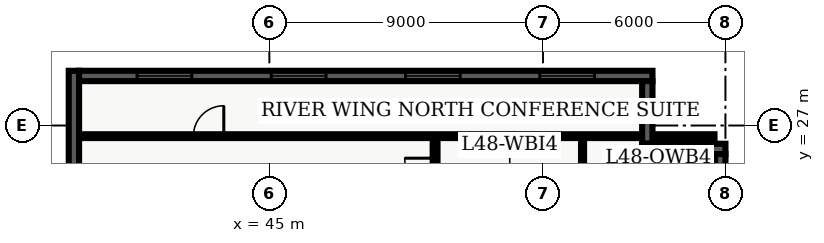
"""IFC4 building model, lengths in metres.
Left out: names, types, materials, properties, quantities, classifications, styles, units other than length and angle.
Written with IfcOpenShell. Run it as: python <this file> out.ifc"""

import sys

from ifc_helpers import new_model, entity, si_unit, converted_unit, direction, frame, origin_with_axes, origin_2d_with_axis, place, context, subcontext, project, spatial, polyline, rectangle, outline, extrude, element, fill, save


model = new_model("IFC4")
c1 = context("Model", 3, precision=1e-05, world=origin_with_axes(), true_north=direction((0.0, 1.0)))
c2 = subcontext(c1, "Body", "Model", "MODEL_VIEW")
j1 = project(units=[si_unit("LENGTHUNIT", "METRE"), converted_unit("PLANEANGLEUNIT", "DEGREE", entity("IfcPlaneAngleMeasure", 0.017), si_unit("PLANEANGLEUNIT", "RADIAN"), dimensions=[0, 0, 0, 0, 0, 0, 0])], contexts=[c1])
p1 = place(None, origin_with_axes())
s1 = spatial("IfcSite", under=j1, at=p1, CompositionType="ELEMENT")
p2 = place(p1, origin_with_axes())
s2 = spatial("IfcBuilding", under=s1, at=p2, CompositionType="ELEMENT")
p3 = place(p2, frame((0.0, 0.0, 196.5), z_axis=(0.0, 0.0, 1.0), x_axis=(1.0, 0.0, 0.0)))
s3 = spatial("IfcBuildingStorey", under=s2, at=p3, CompositionType="ELEMENT", Elevation=196.5)
p4 = place(p3, frame((50.45, 7.85, 0.0), z_axis=(0.0, 0.0, 1.0), x_axis=(0.0, 1.0, 0.0)))
e1 = element("IfcWall", 1, at=p4, inside=s3, PredefinedType="PARTITIONING", context=c2, shape_type="SweptSolid", body=[
    extrude(outline(polyline([(0.0, -0.08), (18.8, -0.08), (18.8, 0.08), (0.0, 0.08), (0.0, -0.08)])), origin_with_axes(), (0.0, 0.0, 1.0), 2.7),
])
p5 = place(p4, frame((0.96, 0.0, 0.0), z_axis=(0.0, 0.0, 1.0), x_axis=(1.0, 0.0, 0.0)))
e2 = element("IfcOpeningElement", 2, at=p5, cuts=e1, PredefinedType="OPENING", context=c2, shape_type="SweptSolid", body=[
    extrude(rectangle(XDim=0.9, YDim=0.18, at=origin_2d_with_axis()), origin_with_axes(), (0.0, 0.0, 1.0), 2.15),
])
p6 = place(p4, frame((6.888, 0.0, 0.0), z_axis=(0.0, 0.0, 1.0), x_axis=(1.0, 0.0, 0.0)))
e3 = element("IfcOpeningElement", 3, at=p6, cuts=e1, PredefinedType="OPENING", context=c2, shape_type="SweptSolid", body=[
    extrude(rectangle(XDim=1.0, YDim=0.18, at=origin_2d_with_axis()), origin_with_axes(), (0.0, 0.0, 1.0), 2.15),
])
p7 = place(p4, frame((12.353, 0.0, 0.0), z_axis=(0.0, 0.0, 1.0), x_axis=(1.0, 0.0, 0.0)))
e4 = element("IfcOpeningElement", 4, at=p7, cuts=e1, PredefinedType="OPENING", context=c2, shape_type="SweptSolid", body=[
    extrude(rectangle(XDim=1.0, YDim=0.18, at=origin_2d_with_axis()), origin_with_axes(), (0.0, 0.0, 1.0), 2.15),
])
p8 = place(p4, frame((17.575, 0.0, 0.0), z_axis=(0.0, 0.0, 1.0), x_axis=(1.0, 0.0, 0.0)))
e5 = element("IfcOpeningElement", 5, at=p8, cuts=e1, PredefinedType="OPENING", context=c2, shape_type="SweptSolid", body=[
    extrude(rectangle(XDim=1.0, YDim=0.18, at=origin_2d_with_axis()), origin_with_axes(), (0.0, 0.0, 1.0), 2.15),
])
p9 = place(p3, frame((38.735, 26.65, 0.0), z_axis=(0.0, 0.0, 1.0), x_axis=(1.0, 0.0, 0.0)))
e6 = element("IfcWall", 6, at=p9, inside=s3, PredefinedType="PARTITIONING", context=c2, shape_type="SweptSolid", body=[
    extrude(outline(polyline([(0.0, -0.062), (20.905, -0.062), (20.905, 0.062), (0.0, 0.062), (0.0, -0.062)])), origin_with_axes(), (0.0, 0.0, 1.0), 2.7),
])
p10 = place(p9, frame((4.265, 0.0, 0.0), z_axis=(0.0, 0.0, 1.0), x_axis=(1.0, 0.0, 0.0)))
e7 = element("IfcOpeningElement", 7, at=p10, cuts=e6, PredefinedType="OPENING", context=c2, shape_type="SweptSolid", body=[
    extrude(rectangle(XDim=1.0, YDim=0.145, at=origin_2d_with_axis()), origin_with_axes(), (0.0, 0.0, 1.0), 2.15),
])
p11 = place(p3, frame((55.3, 7.98, 0.0), z_axis=(0.0, 0.0, 1.0), x_axis=(0.0, 1.0, 0.0)))
e8 = element("IfcWall", 8, at=p11, inside=s3, PredefinedType="PARTITIONING", context=c2, shape_type="SweptSolid", body=[
    extrude(outline(polyline([(0.0, -0.05), (18.54, -0.05), (18.54, 0.05), (0.0, 0.05), (0.0, -0.05)])), origin_with_axes(), (0.0, 0.0, 1.0), 2.7),
])
p12 = place(p11, frame((2.079, 0.0, 0.0), z_axis=(0.0, 0.0, 1.0), x_axis=(1.0, 0.0, 0.0)))
e9 = element("IfcOpeningElement", 9, at=p12, cuts=e8, PredefinedType="OPENING", context=c2, shape_type="SweptSolid", body=[
    extrude(rectangle(XDim=0.95, YDim=0.12, at=origin_2d_with_axis()), origin_with_axes(), (0.0, 0.0, 1.0), 2.15),
])
p13 = place(p11, frame((6.758, 0.0, 0.0), z_axis=(0.0, 0.0, 1.0), x_axis=(1.0, 0.0, 0.0)))
e10 = element("IfcOpeningElement", 10, at=p13, cuts=e8, PredefinedType="OPENING", context=c2, shape_type="SweptSolid", body=[
    extrude(rectangle(XDim=0.95, YDim=0.12, at=origin_2d_with_axis()), origin_with_axes(), (0.0, 0.0, 1.0), 2.15),
])
p14 = place(p11, frame((12.223, 0.0, 0.0), z_axis=(0.0, 0.0, 1.0), x_axis=(1.0, 0.0, 0.0)))
e11 = element("IfcOpeningElement", 11, at=p14, cuts=e8, PredefinedType="OPENING", context=c2, shape_type="SweptSolid", body=[
    extrude(rectangle(XDim=0.95, YDim=0.12, at=origin_2d_with_axis()), origin_with_axes(), (0.0, 0.0, 1.0), 2.15),
])
p15 = place(p11, frame((16.885, 0.0, 0.0), z_axis=(0.0, 0.0, 1.0), x_axis=(1.0, 0.0, 0.0)))
e12 = element("IfcOpeningElement", 12, at=p15, cuts=e8, PredefinedType="OPENING", context=c2, shape_type="SweptSolid", body=[
    extrude(rectangle(XDim=0.95, YDim=0.12, at=origin_2d_with_axis()), origin_with_axes(), (0.0, 0.0, 1.0), 2.15),
])
p16 = place(p3, frame((38.57, 21.26, 0.0), z_axis=(0.0, 0.0, 1.0), x_axis=(0.0, 1.0, 0.0)))
e13 = element("IfcWall", 13, at=p16, inside=s3, PredefinedType="SOLIDWALL", context=c2, shape_type="SweptSolid", body=[
    extrude(outline(polyline([(0.0, -0.17), (7.54, -0.17), (7.54, 0.17), (0.0, 0.17), (0.0, -0.17)])), origin_with_axes(), (0.0, 0.0, 1.0), 3.66),
])
p17 = place(p3, frame((38.74, 28.63, 0.0), z_axis=(0.0, 0.0, 1.0), x_axis=(1.0, 0.0, 0.0)))
e14 = element("IfcWall", 14, at=p17, inside=s3, PredefinedType="SOLIDWALL", context=c2, shape_type="SweptSolid", body=[
    extrude(outline(polyline([(0.0, -0.17), (18.86, -0.17), (18.86, 0.17), (0.0, 0.17), (0.0, -0.17)])), origin_with_axes(), (0.0, 0.0, 1.0), 3.66),
])
p18 = place(p17, frame((2.808, 0.0, 0.45), z_axis=(0.0, 0.0, 1.0), x_axis=(1.0, 0.0, 0.0)))
e15 = element("IfcOpeningElement", 15, at=p18, cuts=e14, PredefinedType="OPENING", context=c2, shape_type="SweptSolid", body=[
    extrude(rectangle(XDim=1.8, YDim=0.36, at=origin_2d_with_axis()), origin_with_axes(), (0.0, 0.0, 1.0), 2.1),
])
p19 = place(p17, frame((7.222, 0.0, 0.45), z_axis=(0.0, 0.0, 1.0), x_axis=(1.0, 0.0, 0.0)))
e16 = element("IfcOpeningElement", 16, at=p19, cuts=e14, PredefinedType="OPENING", context=c2, shape_type="SweptSolid", body=[
    extrude(rectangle(XDim=1.8, YDim=0.36, at=origin_2d_with_axis()), origin_with_axes(), (0.0, 0.0, 1.0), 2.1),
])
p20 = place(p17, frame((11.637, 0.0, 0.45), z_axis=(0.0, 0.0, 1.0), x_axis=(1.0, 0.0, 0.0)))
e17 = element("IfcOpeningElement", 17, at=p20, cuts=e14, PredefinedType="OPENING", context=c2, shape_type="SweptSolid", body=[
    extrude(rectangle(XDim=1.8, YDim=0.36, at=origin_2d_with_axis()), origin_with_axes(), (0.0, 0.0, 1.0), 2.1),
])
p21 = place(p17, frame((16.053, 0.0, 0.45), z_axis=(0.0, 0.0, 1.0), x_axis=(1.0, 0.0, 0.0)))
e18 = element("IfcOpeningElement", 18, at=p21, cuts=e14, PredefinedType="OPENING", context=c2, shape_type="SweptSolid", body=[
    extrude(rectangle(XDim=1.8, YDim=0.36, at=origin_2d_with_axis()), origin_with_axes(), (0.0, 0.0, 1.0), 2.1),
])
p22 = place(p3, frame((57.43, 28.46, 0.0), z_axis=(0.0, 0.0, 1.0), x_axis=(0.0, -1.0, 0.0)))
e19 = element("IfcWall", 19, at=p22, inside=s3, PredefinedType="SOLIDWALL", context=c2, shape_type="SweptSolid", body=[
    extrude(outline(polyline([(0.0, -0.17), (2.06, -0.17), (2.06, 0.17), (0.0, 0.17), (0.0, -0.17)])), origin_with_axes(), (0.0, 0.0, 1.0), 3.66),
])
p23 = place(p3, frame((57.26, 26.23, 0.0), z_axis=(0.0, 0.0, 1.0), x_axis=(1.0, 0.0, 0.0)))
e20 = element("IfcWall", 20, at=p23, inside=s3, PredefinedType="SOLIDWALL", context=c2, shape_type="SweptSolid", body=[
    extrude(outline(polyline([(0.0, -0.17), (2.74, -0.17), (2.74, 0.17), (0.0, 0.17), (0.0, -0.17)])), origin_with_axes(), (0.0, 0.0, 1.0), 3.66),
])
p24 = place(p3, frame((59.83, 26.06, 0.0), z_axis=(0.0, 0.0, 1.0), x_axis=(0.0, -1.0, 0.0)))
e21 = element("IfcWall", 21, at=p24, inside=s3, PredefinedType="SOLIDWALL", context=c2, shape_type="SweptSolid", body=[
    extrude(outline(polyline([(0.0, -0.17), (23.66, -0.17), (23.66, 0.17), (0.0, 0.17), (0.0, -0.17)])), origin_with_axes(), (0.0, 0.0, 1.0), 3.66),
])
p25 = place(p24, frame((11.83, 0.0, 0.45), z_axis=(0.0, 0.0, 1.0), x_axis=(1.0, 0.0, 0.0)))
e22 = element("IfcOpeningElement", 22, at=p25, cuts=e21, PredefinedType="OPENING", context=c2, shape_type="SweptSolid", body=[
    extrude(rectangle(XDim=1.8, YDim=0.36, at=origin_2d_with_axis()), origin_with_axes(), (0.0, 0.0, 1.0), 2.1),
])
p26 = place(p24, frame((20.364, 0.0, 0.45), z_axis=(0.0, 0.0, 1.0), x_axis=(1.0, 0.0, 0.0)))
e23 = element("IfcOpeningElement", 23, at=p26, cuts=e21, PredefinedType="OPENING", context=c2, shape_type="SweptSolid", body=[
    extrude(rectangle(XDim=1.8, YDim=0.36, at=origin_2d_with_axis()), origin_with_axes(), (0.0, 0.0, 1.0), 2.1),
])
p27 = place(p9, frame((4.265, 0.0, 0.0), z_axis=(0.0, 0.0, 1.0), x_axis=(1.0, 0.0, 0.0)))
e24 = element("IfcDoor", 24, at=p27, inside=s3, OperationType="SINGLE_SWING_RIGHT", PredefinedType="DOOR", context=c2, shape_type="SweptSolid", body=[
    extrude(rectangle(XDim=1.0, YDim=0.075, at=origin_2d_with_axis()), origin_with_axes(), (0.0, 0.0, 1.0), 2.15),
])
fill(e7, e24)
p28 = place(p4, frame((17.575, 0.0, 0.0), z_axis=(0.0, 0.0, 1.0), x_axis=(1.0, 0.0, 0.0)))
e25 = element("IfcDoor", 25, at=p28, inside=s3, OperationType="SINGLE_SWING_RIGHT", PredefinedType="DOOR", context=c2, shape_type="SweptSolid", body=[
    extrude(rectangle(XDim=1.0, YDim=0.09, at=origin_2d_with_axis()), origin_with_axes(), (0.0, 0.0, 1.0), 2.15),
])
fill(e5, e25)
p29 = place(p17, frame((2.808, 0.0, 0.45), z_axis=(0.0, 0.0, 1.0), x_axis=(1.0, 0.0, 0.0)))
e26 = element("IfcWindow", 26, at=p29, inside=s3, PredefinedType="WINDOW", context=c2, shape_type="SweptSolid", body=[
    extrude(rectangle(XDim=1.8, YDim=0.09, at=origin_2d_with_axis()), origin_with_axes(), (0.0, 0.0, 1.0), 2.1),
])
fill(e15, e26)
p30 = place(p17, frame((7.222, 0.0, 0.45), z_axis=(0.0, 0.0, 1.0), x_axis=(1.0, 0.0, 0.0)))
e27 = element("IfcWindow", 27, at=p30, inside=s3, PredefinedType="WINDOW", context=c2, shape_type="SweptSolid", body=[
    extrude(rectangle(XDim=1.8, YDim=0.09, at=origin_2d_with_axis()), origin_with_axes(), (0.0, 0.0, 1.0), 2.1),
])
fill(e16, e27)
p31 = place(p17, frame((11.637, 0.0, 0.45), z_axis=(0.0, 0.0, 1.0), x_axis=(1.0, 0.0, 0.0)))
e28 = element("IfcWindow", 28, at=p31, inside=s3, PredefinedType="WINDOW", context=c2, shape_type="SweptSolid", body=[
    extrude(rectangle(XDim=1.8, YDim=0.09, at=origin_2d_with_axis()), origin_with_axes(), (0.0, 0.0, 1.0), 2.1),
])
fill(e17, e28)
p32 = place(p17, frame((16.053, 0.0, 0.45), z_axis=(0.0, 0.0, 1.0), x_axis=(1.0, 0.0, 0.0)))
e29 = element("IfcWindow", 29, at=p32, inside=s3, PredefinedType="WINDOW", context=c2, shape_type="SweptSolid", body=[
    extrude(rectangle(XDim=1.8, YDim=0.09, at=origin_2d_with_axis()), origin_with_axes(), (0.0, 0.0, 1.0), 2.1),
])
fill(e18, e29)
save(model, sys.argv[1])
